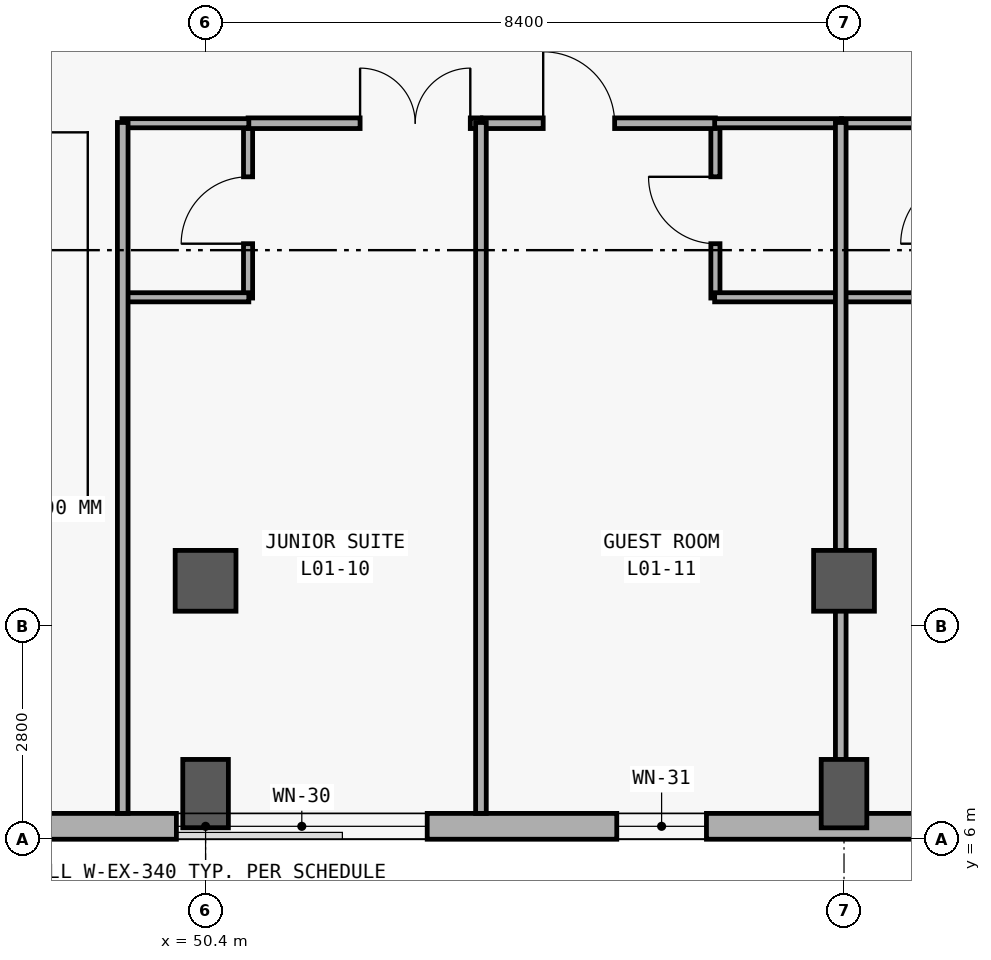
"""IFC4 building model, lengths in metres.
Left out: names, types, materials, properties, quantities, classifications, styles, units other than length and angle.
Written with IfcOpenShell. Run it as: python <this file> out.ifc"""

import sys

from ifc_helpers import new_model, si_unit, direction, frame, frame_2d, origin, origin_2d, place, context, subcontext, project, spatial, rectangle, extrude, element, fill, save


model = new_model("IFC4")
c1 = context("Model", 3, precision=1e-05, world=origin(), true_north=direction((0.0, 1.0)))
c2 = subcontext(c1, "Body", "Model", "MODEL_VIEW")
j1 = project(units=[si_unit("LENGTHUNIT", "METRE"), si_unit("PLANEANGLEUNIT", "RADIAN")], contexts=[c1])
p1 = place(None, origin())
s1 = spatial("IfcSite", under=j1, at=p1, CompositionType="ELEMENT")
p2 = place(p1, origin())
s2 = spatial("IfcBuilding", under=s1, at=p2, CompositionType="ELEMENT")
p3 = place(p2, frame((0.0, 0.0, 5.4)))
s3 = spatial("IfcBuildingStorey", under=s2, at=p3, CompositionType="ELEMENT", Elevation=5.4)
p4 = place(p3, frame((50.4, 6.6, 0.0), z_axis=(0.0, 0.0, 1.0), x_axis=(0.0, 1.0, 0.0)))
e1 = element("IfcColumn", 1, at=p4, inside=s3, PredefinedType="COLUMN", context=c2, shape_type="SweptSolid", body=[
    extrude(rectangle(XDim=0.6, YDim=0.9, at=origin_2d()), origin(), (0.0, 0.0, 1.0), 5.4),
])
p5 = place(p3, frame((50.4, 9.4, 0.0), z_axis=(0.0, 0.0, 1.0), x_axis=(1.0, 0.0, 0.0)))
e2 = element("IfcColumn", 2, at=p5, inside=s3, PredefinedType="COLUMN", context=c2, shape_type="SweptSolid", body=[
    extrude(rectangle(XDim=0.8, YDim=0.8, at=origin_2d()), origin(), (0.0, 0.0, 1.0), 5.4),
])
p6 = place(p3, frame((58.8, 6.6, 0.0), z_axis=(0.0, 0.0, 1.0), x_axis=(0.0, 1.0, 0.0)))
e3 = element("IfcColumn", 3, at=p6, inside=s3, PredefinedType="COLUMN", context=c2, shape_type="SweptSolid", body=[
    extrude(rectangle(XDim=0.6, YDim=0.9, at=origin_2d()), origin(), (0.0, 0.0, 1.0), 5.4),
])
p7 = place(p3, frame((58.8, 9.4, 0.0), z_axis=(0.0, 0.0, 1.0), x_axis=(1.0, 0.0, 0.0)))
e4 = element("IfcColumn", 4, at=p7, inside=s3, PredefinedType="COLUMN", context=c2, shape_type="SweptSolid", body=[
    extrude(rectangle(XDim=0.8, YDim=0.8, at=origin_2d()), origin(), (0.0, 0.0, 1.0), 5.4),
])
p8 = place(p3, frame((92.06, 6.17, 0.0), z_axis=(0.0, 0.0, 1.0), x_axis=(-1.0, 0.0, 0.0)))
e5 = element("IfcWall", 5, at=p8, inside=s3, PredefinedType="SOLIDWALL", context=c2, shape_type="SweptSolid", body=[
    extrude(rectangle(XDim=83.32, YDim=0.34, at=frame_2d((41.66, 0.0))), origin(), (0.0, 0.0, 1.0), 5.1),
])
p9 = place(p8, frame((80.804, 0.0, 0.85)))
e6 = element("IfcOpeningElement", 6, at=p9, cuts=e5, PredefinedType="OPENING", context=c2, shape_type="SweptSolid", body=[
    extrude(rectangle(XDim=1.8, YDim=1.8, at=frame_2d((0.9, 0.9))), frame((0.0, 0.18, 0.0), z_axis=(0.0, -1.0, 0.0), x_axis=(1.0, 0.0, 0.0)), (0.0, 0.0, 1.0), 0.36),
])
p10 = place(p8, frame((78.043, 0.0, 0.85)))
e7 = element("IfcOpeningElement", 7, at=p10, cuts=e5, PredefinedType="OPENING", context=c2, shape_type="SweptSolid", body=[
    extrude(rectangle(XDim=1.5, YDim=1.75, at=frame_2d((0.75, 0.875))), frame((0.0, 0.18, 0.0), z_axis=(0.0, -1.0, 0.0), x_axis=(1.0, 0.0, 0.0)), (0.0, 0.0, 1.0), 0.36),
])
p11 = place(p8, frame((75.057, 0.0, 0.85)))
e8 = element("IfcOpeningElement", 8, at=p11, cuts=e5, PredefinedType="OPENING", context=c2, shape_type="SweptSolid", body=[
    extrude(rectangle(XDim=1.65, YDim=1.75, at=frame_2d((0.825, 0.875))), frame((0.0, 0.18, 0.0), z_axis=(0.0, -1.0, 0.0), x_axis=(1.0, 0.0, 0.0)), (0.0, 0.0, 1.0), 0.36),
])
p12 = place(p8, frame((71.997, 0.0, 0.85)))
e9 = element("IfcOpeningElement", 9, at=p12, cuts=e5, PredefinedType="OPENING", context=c2, shape_type="SweptSolid", body=[
    extrude(rectangle(XDim=1.95, YDim=1.75, at=frame_2d((0.975, 0.875))), frame((0.0, 0.18, 0.0), z_axis=(0.0, -1.0, 0.0), x_axis=(1.0, 0.0, 0.0)), (0.0, 0.0, 1.0), 0.36),
])
p13 = place(p8, frame((69.36, 0.0, 0.85)))
e10 = element("IfcOpeningElement", 10, at=p13, cuts=e5, PredefinedType="OPENING", context=c2, shape_type="SweptSolid", body=[
    extrude(rectangle(XDim=1.4, YDim=1.6, at=frame_2d((0.7, 0.8))), frame((0.0, 0.18, 0.0), z_axis=(0.0, -1.0, 0.0), x_axis=(1.0, 0.0, 0.0)), (0.0, 0.0, 1.0), 0.36),
])
p14 = place(p8, frame((66.349, 0.0, 0.85)))
e11 = element("IfcOpeningElement", 11, at=p14, cuts=e5, PredefinedType="OPENING", context=c2, shape_type="SweptSolid", body=[
    extrude(rectangle(XDim=1.6, YDim=1.6, at=frame_2d((0.8, 0.8))), frame((0.0, 0.18, 0.0), z_axis=(0.0, -1.0, 0.0), x_axis=(1.0, 0.0, 0.0)), (0.0, 0.0, 1.0), 0.36),
])
p15 = place(p8, frame((63.338, 0.0, 0.85)))
e12 = element("IfcOpeningElement", 12, at=p15, cuts=e5, PredefinedType="OPENING", context=c2, shape_type="SweptSolid", body=[
    extrude(rectangle(XDim=1.8, YDim=1.6, at=frame_2d((0.9, 0.8))), frame((0.0, 0.18, 0.0), z_axis=(0.0, -1.0, 0.0), x_axis=(1.0, 0.0, 0.0)), (0.0, 0.0, 1.0), 0.36),
])
p16 = place(p8, frame((60.327, 0.0, 0.85)))
e13 = element("IfcOpeningElement", 13, at=p16, cuts=e5, PredefinedType="OPENING", context=c2, shape_type="SweptSolid", body=[
    extrude(rectangle(XDim=2.0, YDim=1.65, at=frame_2d((1.0, 0.825))), frame((0.0, 0.18, 0.0), z_axis=(0.0, -1.0, 0.0), x_axis=(1.0, 0.0, 0.0)), (0.0, 0.0, 1.0), 0.36),
])
p17 = place(p8, frame((57.791, 0.0, 0.85)))
e14 = element("IfcOpeningElement", 14, at=p17, cuts=e5, PredefinedType="OPENING", context=c2, shape_type="SweptSolid", body=[
    extrude(rectangle(XDim=1.25, YDim=1.45, at=frame_2d((0.625, 0.725))), frame((0.0, 0.18, 0.0), z_axis=(0.0, -1.0, 0.0), x_axis=(1.0, 0.0, 0.0)), (0.0, 0.0, 1.0), 0.36),
])
p18 = place(p8, frame((38.744, 0.0, 0.85)))
e15 = element("IfcOpeningElement", 15, at=p18, cuts=e5, PredefinedType="OPENING", context=c2, shape_type="SweptSolid", body=[
    extrude(rectangle(XDim=3.3, YDim=2.15, at=frame_2d((1.65, 1.075))), frame((0.0, 0.18, 0.0), z_axis=(0.0, -1.0, 0.0), x_axis=(1.0, 0.0, 0.0)), (0.0, 0.0, 1.0), 0.36),
])
p19 = place(p8, frame((35.07, 0.0, 0.85)))
e16 = element("IfcOpeningElement", 16, at=p19, cuts=e5, PredefinedType="OPENING", context=c2, shape_type="SweptSolid", body=[
    extrude(rectangle(XDim=1.18, YDim=1.5, at=frame_2d((0.59, 0.75))), frame((0.0, 0.18, 0.0), z_axis=(0.0, -1.0, 0.0), x_axis=(1.0, 0.0, 0.0)), (0.0, 0.0, 1.0), 0.36),
])
p20 = place(p8, frame((30.287, 0.0, 0.85)))
e17 = element("IfcOpeningElement", 17, at=p20, cuts=e5, PredefinedType="OPENING", context=c2, shape_type="SweptSolid", body=[
    extrude(rectangle(XDim=1.28, YDim=1.6, at=frame_2d((0.64, 0.8))), frame((0.0, 0.18, 0.0), z_axis=(0.0, -1.0, 0.0), x_axis=(1.0, 0.0, 0.0)), (0.0, 0.0, 1.0), 0.36),
])
p21 = place(p8, frame((25.503, 0.0, 0.85)))
e18 = element("IfcOpeningElement", 18, at=p21, cuts=e5, PredefinedType="OPENING", context=c2, shape_type="SweptSolid", body=[
    extrude(rectangle(XDim=1.38, YDim=1.7, at=frame_2d((0.69, 0.85))), frame((0.0, 0.18, 0.0), z_axis=(0.0, -1.0, 0.0), x_axis=(1.0, 0.0, 0.0)), (0.0, 0.0, 1.0), 0.36),
])
p22 = place(p8, frame((20.72, 0.0, 0.85)))
e19 = element("IfcOpeningElement", 19, at=p22, cuts=e5, PredefinedType="OPENING", context=c2, shape_type="SweptSolid", body=[
    extrude(rectangle(XDim=1.48, YDim=1.8, at=frame_2d((0.74, 0.9))), frame((0.0, 0.18, 0.0), z_axis=(0.0, -1.0, 0.0), x_axis=(1.0, 0.0, 0.0)), (0.0, 0.0, 1.0), 0.36),
])
p23 = place(p8, frame((15.937, 0.0, 0.85)))
e20 = element("IfcOpeningElement", 20, at=p23, cuts=e5, PredefinedType="OPENING", context=c2, shape_type="SweptSolid", body=[
    extrude(rectangle(XDim=1.58, YDim=1.85, at=frame_2d((0.79, 0.925))), frame((0.0, 0.18, 0.0), z_axis=(0.0, -1.0, 0.0), x_axis=(1.0, 0.0, 0.0)), (0.0, 0.0, 1.0), 0.36),
])
p24 = place(p8, frame((11.154, 0.0, 0.85)))
e21 = element("IfcOpeningElement", 21, at=p24, cuts=e5, PredefinedType="OPENING", context=c2, shape_type="SweptSolid", body=[
    extrude(rectangle(XDim=1.68, YDim=1.9, at=frame_2d((0.84, 0.95))), frame((0.0, 0.18, 0.0), z_axis=(0.0, -1.0, 0.0), x_axis=(1.0, 0.0, 0.0)), (0.0, 0.0, 1.0), 0.36),
])
p25 = place(p8, frame((6.37, 0.0, 0.85)))
e22 = element("IfcOpeningElement", 22, at=p25, cuts=e5, PredefinedType="OPENING", context=c2, shape_type="SweptSolid", body=[
    extrude(rectangle(XDim=1.78, YDim=1.95, at=frame_2d((0.89, 0.975))), frame((0.0, 0.18, 0.0), z_axis=(0.0, -1.0, 0.0), x_axis=(1.0, 0.0, 0.0)), (0.0, 0.0, 1.0), 0.36),
])
p26 = place(p8, frame((1.586, 0.0, 0.85)))
e23 = element("IfcOpeningElement", 23, at=p26, cuts=e5, PredefinedType="OPENING", context=c2, shape_type="SweptSolid", body=[
    extrude(rectangle(XDim=1.88, YDim=1.95, at=frame_2d((0.94, 0.975))), frame((0.0, 0.18, 0.0), z_axis=(0.0, -1.0, 0.0), x_axis=(1.0, 0.0, 0.0)), (0.0, 0.0, 1.0), 0.36),
])
p27 = place(p3, frame((50.959, 13.12, 0.0), z_axis=(0.0, 0.0, 1.0), x_axis=(0.0, 1.0, 0.0)))
e24 = element("IfcWall", 24, at=p27, inside=s3, PredefinedType="PARTITIONING", context=c2, shape_type="SweptSolid", body=[
    extrude(rectangle(XDim=2.31, YDim=0.12, at=frame_2d((1.155, 0.0))), origin(), (0.0, 0.0, 1.0), 4.18),
])
p28 = place(p27, frame((0.715, 0.0, 0.0)))
e25 = element("IfcOpeningElement", 25, at=p28, cuts=e24, PredefinedType="OPENING", context=c2, shape_type="SweptSolid", body=[
    extrude(rectangle(XDim=0.88, YDim=2.15, at=frame_2d((0.44, 1.075))), frame((0.0, 0.07, 0.0), z_axis=(0.0, -1.0, 0.0), x_axis=(1.0, 0.0, 0.0)), (0.0, 0.0, 1.0), 0.14),
])
p29 = place(p3, frame((57.108, 13.12, 0.0), z_axis=(0.0, 0.0, 1.0), x_axis=(0.0, 1.0, 0.0)))
e26 = element("IfcWall", 26, at=p29, inside=s3, PredefinedType="PARTITIONING", context=c2, shape_type="SweptSolid", body=[
    extrude(rectangle(XDim=2.31, YDim=0.12, at=frame_2d((1.155, 0.0))), origin(), (0.0, 0.0, 1.0), 4.18),
])
p30 = place(p29, frame((0.715, 0.0, 0.0)))
e27 = element("IfcOpeningElement", 27, at=p30, cuts=e26, PredefinedType="OPENING", context=c2, shape_type="SweptSolid", body=[
    extrude(rectangle(XDim=0.88, YDim=2.15, at=frame_2d((0.44, 1.075))), frame((0.0, 0.07, 0.0), z_axis=(0.0, -1.0, 0.0), x_axis=(1.0, 0.0, 0.0)), (0.0, 0.0, 1.0), 0.14),
])
p31 = place(p3, frame((50.959, 15.42, 0.0), z_axis=(0.0, 0.0, 1.0), x_axis=(1.0, 0.0, 0.0)))
e28 = element("IfcWall", 28, at=p31, inside=s3, PredefinedType="PARTITIONING", context=c2, shape_type="SweptSolid", body=[
    extrude(rectangle(XDim=3.064, YDim=0.14, at=frame_2d((1.532, 0.0))), origin(), (0.0, 0.0, 1.0), 4.18),
])
p32 = place(p31, frame((1.474, 0.0, 0.0)))
e29 = element("IfcOpeningElement", 29, at=p32, cuts=e28, PredefinedType="OPENING", context=c2, shape_type="SweptSolid", body=[
    extrude(rectangle(XDim=1.45, YDim=2.3, at=frame_2d((0.725, 1.15))), frame((0.0, 0.08, 0.0), z_axis=(0.0, -1.0, 0.0), x_axis=(1.0, 0.0, 0.0)), (0.0, 0.0, 1.0), 0.16),
])
p33 = place(p3, frame((54.043, 15.42, 0.0), z_axis=(0.0, 0.0, 1.0), x_axis=(1.0, 0.0, 0.0)))
e30 = element("IfcWall", 30, at=p33, inside=s3, PredefinedType="PARTITIONING", context=c2, shape_type="SweptSolid", body=[
    extrude(rectangle(XDim=3.065, YDim=0.14, at=frame_2d((1.532, 0.0))), origin(), (0.0, 0.0, 1.0), 4.18),
])
p34 = place(p33, frame((0.799, 0.0, 0.0)))
e31 = element("IfcOpeningElement", 31, at=p34, cuts=e30, PredefinedType="OPENING", context=c2, shape_type="SweptSolid", body=[
    extrude(rectangle(XDim=0.94, YDim=2.2, at=frame_2d((0.47, 1.1))), frame((0.0, 0.08, 0.0), z_axis=(0.0, -1.0, 0.0), x_axis=(1.0, 0.0, 0.0)), (0.0, 0.0, 1.0), 0.16),
])
for number, where, z_axis, x_axis in (
    (32, (49.3, 13.13, 0.0), (0.0, 0.0, 1.0), (1.0, 0.0, 0.0)),
    (33, (49.3, 15.42, 0.0), (0.0, 0.0, 1.0), (1.0, 0.0, 0.0)),
):
    element("IfcWall", number, at=place(p3, frame(where, z_axis=z_axis, x_axis=x_axis)), inside=s3, PredefinedType="PARTITIONING", context=c2, shape_type="SweptSolid", body=[
        extrude(rectangle(XDim=1.669, YDim=0.12, at=frame_2d((0.834, 0.0))), origin(), (0.0, 0.0, 1.0), 4.18),
    ])
for number, where, z_axis, x_axis in (
    (34, (57.098, 13.13, 0.0), (0.0, 0.0, 1.0), (1.0, 0.0, 0.0)),
    (35, (57.098, 15.42, 0.0), (0.0, 0.0, 1.0), (1.0, 0.0, 0.0)),
):
    element("IfcWall", number, at=place(p3, frame(where, z_axis=z_axis, x_axis=x_axis)), inside=s3, PredefinedType="PARTITIONING", context=c2, shape_type="SweptSolid", body=[
        extrude(rectangle(XDim=1.669, YDim=0.12, at=frame_2d((0.834, 0.0))), origin(), (0.0, 0.0, 1.0), 4.18),
    ])
for number, where, z_axis, x_axis in (
    (36, (58.767, 13.13, 0.0), (0.0, 0.0, 1.0), (1.0, 0.0, 0.0)),
    (37, (58.767, 15.42, 0.0), (0.0, 0.0, 1.0), (1.0, 0.0, 0.0)),
):
    element("IfcWall", number, at=place(p3, frame(where, z_axis=z_axis, x_axis=x_axis)), inside=s3, PredefinedType="PARTITIONING", context=c2, shape_type="SweptSolid", body=[
        extrude(rectangle(XDim=1.669, YDim=0.12, at=frame_2d((0.834, 0.0))), origin(), (0.0, 0.0, 1.0), 4.18),
    ])
for number, where, z_axis, x_axis in (
    (38, (49.31, 6.34, 0.0), (0.0, 0.0, 1.0), (0.0, 1.0, 0.0)),
    (39, (54.023, 6.34, 0.0), (0.0, 0.0, 1.0), (0.0, 1.0, 0.0)),
    (40, (58.757, 6.34, 0.0), (0.0, 0.0, 1.0), (0.0, 1.0, 0.0)),
):
    element("IfcWall", number, at=place(p3, frame(where, z_axis=z_axis, x_axis=x_axis)), inside=s3, PredefinedType="PARTITIONING", context=c2, shape_type="SweptSolid", body=[
        extrude(rectangle(XDim=9.09, YDim=0.14, at=frame_2d((4.545, 0.0))), origin(), (0.0, 0.0, 1.0), 4.18),
    ])
p35 = place(p18, origin())
e41 = element("IfcWindow", 41, at=p35, inside=s3, PartitioningType="SINGLE_PANEL", PredefinedType="WINDOW", context=c2, shape_type="SweptSolid", body=[
    extrude(rectangle(XDim=3.3, YDim=2.15, at=frame_2d((1.65, 1.075))), frame((0.0, 0.03, 0.0), z_axis=(0.0, -1.0, 0.0), x_axis=(1.0, 0.0, 0.0)), (0.0, 0.0, 1.0), 0.06),
])
fill(e15, e41)
p36 = place(p19, origin())
e42 = element("IfcWindow", 42, at=p36, inside=s3, PartitioningType="SINGLE_PANEL", PredefinedType="WINDOW", context=c2, shape_type="SweptSolid", body=[
    extrude(rectangle(XDim=1.18, YDim=1.5, at=frame_2d((0.59, 0.75))), frame((0.0, 0.03, 0.0), z_axis=(0.0, -1.0, 0.0), x_axis=(1.0, 0.0, 0.0)), (0.0, 0.0, 1.0), 0.06),
])
fill(e16, e42)
p37 = place(p28, origin())
e43 = element("IfcDoor", 43, at=p37, inside=s3, OperationType="SINGLE_SWING_LEFT", PredefinedType="DOOR", context=c2, shape_type="SweptSolid", body=[
    extrude(rectangle(XDim=0.88, YDim=2.15, at=frame_2d((0.44, 1.075))), frame((0.0, 0.025, 0.0), z_axis=(0.0, -1.0, 0.0), x_axis=(1.0, 0.0, 0.0)), (0.0, 0.0, 1.0), 0.05),
])
fill(e25, e43)
p38 = place(p30, origin())
e44 = element("IfcDoor", 44, at=p38, inside=s3, OperationType="SINGLE_SWING_RIGHT", PredefinedType="DOOR", context=c2, shape_type="SweptSolid", body=[
    extrude(rectangle(XDim=0.88, YDim=2.15, at=frame_2d((0.44, 1.075))), frame((0.0, 0.025, 0.0), z_axis=(0.0, -1.0, 0.0), x_axis=(1.0, 0.0, 0.0)), (0.0, 0.0, 1.0), 0.05),
])
fill(e27, e44)
p39 = place(p32, origin())
e45 = element("IfcDoor", 45, at=p39, inside=s3, OperationType="DOUBLE_DOOR_SINGLE_SWING", PredefinedType="DOOR", context=c2, shape_type="SweptSolid", body=[
    extrude(rectangle(XDim=1.45, YDim=2.3, at=frame_2d((0.725, 1.15))), frame((0.0, 0.025, 0.0), z_axis=(0.0, -1.0, 0.0), x_axis=(1.0, 0.0, 0.0)), (0.0, 0.0, 1.0), 0.05),
])
fill(e29, e45)
p40 = place(p34, origin())
e46 = element("IfcDoor", 46, at=p40, inside=s3, OperationType="SINGLE_SWING_LEFT", PredefinedType="DOOR", context=c2, shape_type="SweptSolid", body=[
    extrude(rectangle(XDim=0.94, YDim=2.2, at=frame_2d((0.47, 1.1))), frame((0.0, 0.025, 0.0), z_axis=(0.0, -1.0, 0.0), x_axis=(1.0, 0.0, 0.0)), (0.0, 0.0, 1.0), 0.05),
])
fill(e31, e46)
save(model, sys.argv[1])
